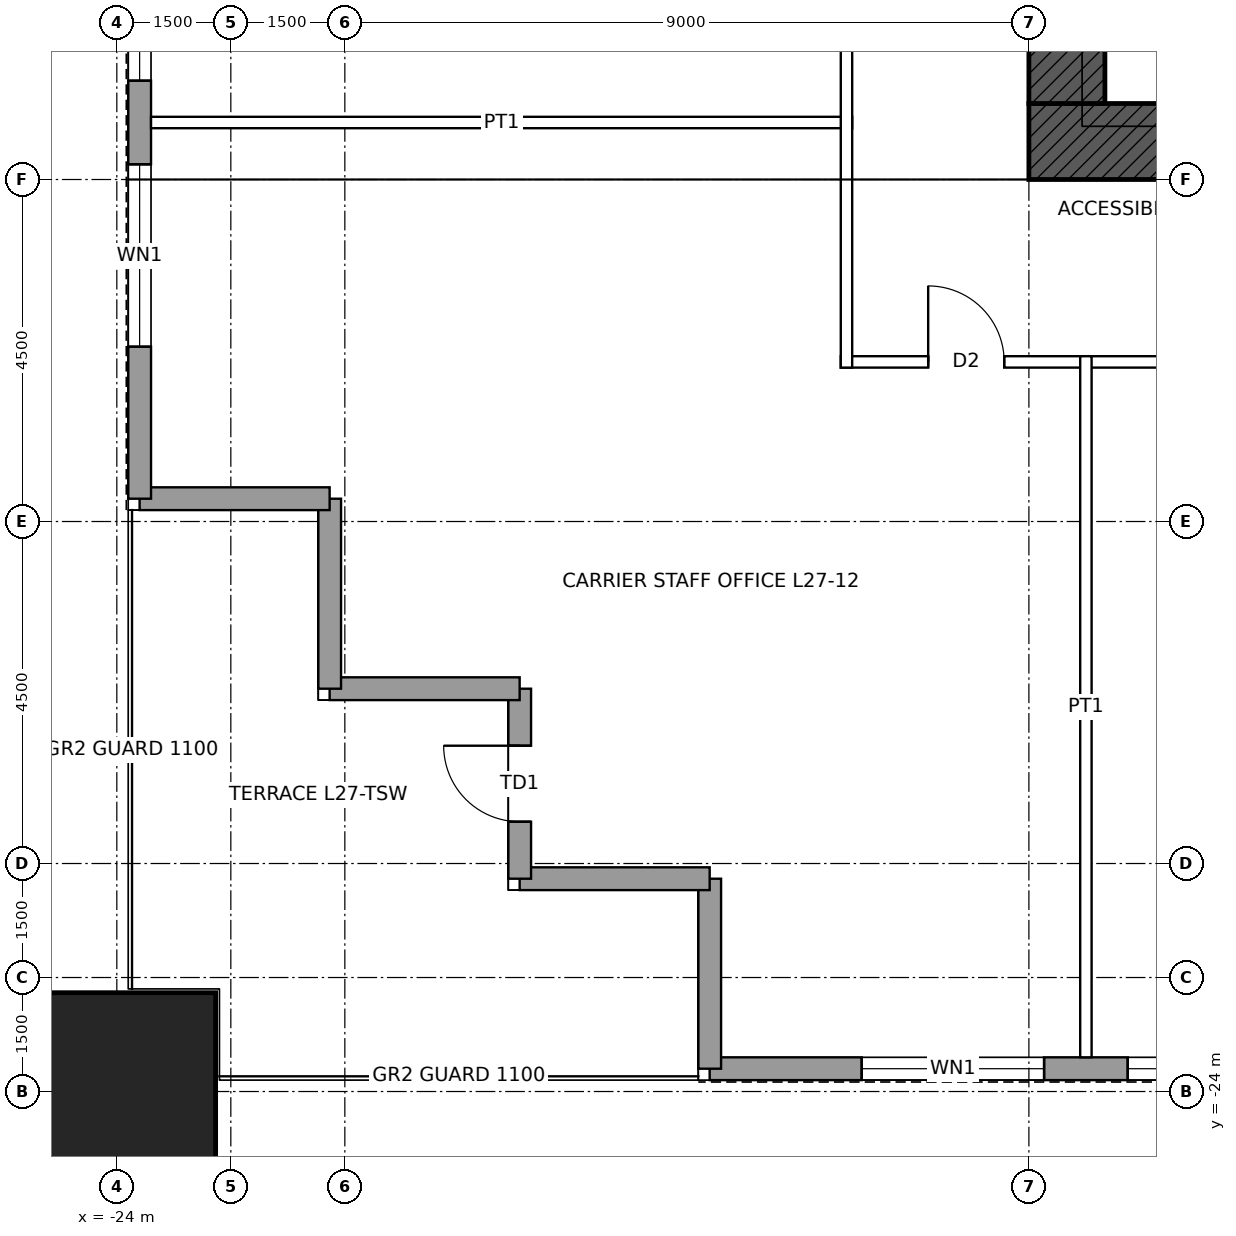
"""IFC4 building model, lengths in metres.
Left out: names, types, materials, properties, quantities, classifications, styles, units other than length and angle.
Written with IfcOpenShell. Run it as: python <this file> out.ifc"""

import sys

from ifc_helpers import new_model, si_unit, direction, frame, frame_2d, origin, origin_2d, place, context, subcontext, project, spatial, rectangle, hollow_rectangle, extrude, element, fill, save


model = new_model("IFC4")
c1 = context("Model", 3, precision=1e-05, world=origin(), true_north=direction((0.0, 1.0)))
c2 = subcontext(c1, "Body", "Model", "MODEL_VIEW")
j1 = project(units=[si_unit("LENGTHUNIT", "METRE"), si_unit("PLANEANGLEUNIT", "RADIAN")], contexts=[c1])
p1 = place(None, origin())
s1 = spatial("IfcSite", under=j1, at=p1, CompositionType="ELEMENT")
p2 = place(p1, origin())
s2 = spatial("IfcBuilding", under=s1, at=p2, CompositionType="ELEMENT")
p3 = place(p2, frame((0.0, 0.0, 135.9)))
s3 = spatial("IfcBuildingStorey", under=s2, at=p3, CompositionType="ELEMENT", Elevation=135.9)
p4 = place(p3, frame((-24.0, -24.0, 0.0), z_axis=(0.0, 0.0, 1.0), x_axis=(1.0, 0.0, 0.0)))
e1 = element("IfcColumn", 1, at=p4, inside=s3, PredefinedType="COLUMN", context=c2, shape_type="SweptSolid", body=[
    extrude(hollow_rectangle(XDim=2.6, YDim=2.6, WallThickness=0.13, at=origin_2d()), origin(), (0.0, 0.0, 1.0), 4.5),
])
p5 = place(p3, frame((12.0, -11.5, 0.0), z_axis=(0.0, 0.0, 1.0), x_axis=(-1.0, 0.0, 0.0)))
e2 = element("IfcWall", 2, at=p5, inside=s3, PredefinedType="SHEAR", context=c2, shape_type="SweptSolid", body=[
    extrude(rectangle(XDim=24.0, YDim=1.0, at=frame_2d((12.0, 0.0))), origin(), (0.0, 0.0, 1.0), 4.5),
])
p6 = place(p5, frame((11.5, 0.0, 0.0)))
e3 = element("IfcOpeningElement", 3, at=p6, cuts=e2, PredefinedType="OPENING", context=c2, shape_type="SweptSolid", body=[
    extrude(rectangle(XDim=1.0, YDim=2.1, at=frame_2d((0.5, 1.05))), frame((0.0, 0.51, 0.0), z_axis=(0.0, -1.0, 0.0), x_axis=(1.0, 0.0, 0.0)), (0.0, 0.0, 1.0), 1.02),
])
p7 = place(p5, frame((1.0, 0.0, 0.0)))
e4 = element("IfcOpeningElement", 4, at=p7, cuts=e2, PredefinedType="OPENING", context=c2, shape_type="SweptSolid", body=[
    extrude(rectangle(XDim=1.0, YDim=2.4, at=frame_2d((0.5, 1.2))), frame((0.0, 0.51, 0.0), z_axis=(0.0, -1.0, 0.0), x_axis=(1.0, 0.0, 0.0)), (0.0, 0.0, 1.0), 1.02),
])
p8 = place(p3, frame((-11.5, -11.0, 0.0), z_axis=(0.0, 0.0, 1.0), x_axis=(0.0, 1.0, 0.0)))
e5 = element("IfcWall", 5, at=p8, inside=s3, PredefinedType="SHEAR", context=c2, shape_type="SweptSolid", body=[
    extrude(rectangle(XDim=22.0, YDim=1.0, at=frame_2d((11.0, 0.0))), origin(), (0.0, 0.0, 1.0), 4.5),
])
p9 = place(p8, frame((10.5, 0.0, 0.0)))
e6 = element("IfcOpeningElement", 6, at=p9, cuts=e5, PredefinedType="OPENING", context=c2, shape_type="SweptSolid", body=[
    extrude(rectangle(XDim=1.0, YDim=2.4, at=frame_2d((0.5, 1.2))), frame((0.0, 0.51, 0.0), z_axis=(0.0, -1.0, 0.0), x_axis=(1.0, 0.0, 0.0)), (0.0, 0.0, 1.0), 1.02),
])
p10 = place(p3, frame((16.2, -23.7, 0.0), z_axis=(0.0, 0.0, 1.0), x_axis=(-1.0, 0.0, 0.0)))
e7 = element("IfcWall", 7, at=p10, inside=s3, PredefinedType="SOLIDWALL", context=c2, shape_type="SweptSolid", body=[
    extrude(rectangle(XDim=32.4, YDim=0.3, at=frame_2d((16.2, 0.0))), origin(), (0.0, 0.0, 1.0), 4.3),
])
p11 = place(p10, frame((2.0, 0.0, 1.0)))
e8 = element("IfcOpeningElement", 8, at=p11, cuts=e7, PredefinedType="OPENING", context=c2, shape_type="SweptSolid", body=[
    extrude(rectangle(XDim=2.4, YDim=1.2, at=frame_2d((1.2, 0.6))), frame((0.0, 0.16, 0.0), z_axis=(0.0, -1.0, 0.0), x_axis=(1.0, 0.0, 0.0)), (0.0, 0.0, 1.0), 0.32),
])
p12 = place(p10, frame((5.5, 0.0, 1.0)))
e9 = element("IfcOpeningElement", 9, at=p12, cuts=e7, PredefinedType="OPENING", context=c2, shape_type="SweptSolid", body=[
    extrude(rectangle(XDim=2.4, YDim=1.2, at=frame_2d((1.2, 0.6))), frame((0.0, 0.16, 0.0), z_axis=(0.0, -1.0, 0.0), x_axis=(1.0, 0.0, 0.0)), (0.0, 0.0, 1.0), 0.32),
])
p13 = place(p10, frame((9.5, 0.0, 1.0)))
e10 = element("IfcOpeningElement", 10, at=p13, cuts=e7, PredefinedType="OPENING", context=c2, shape_type="SweptSolid", body=[
    extrude(rectangle(XDim=2.4, YDim=1.2, at=frame_2d((1.2, 0.6))), frame((0.0, 0.16, 0.0), z_axis=(0.0, -1.0, 0.0), x_axis=(1.0, 0.0, 0.0)), (0.0, 0.0, 1.0), 0.32),
])
p14 = place(p10, frame((13.0, 0.0, 1.0)))
e11 = element("IfcOpeningElement", 11, at=p14, cuts=e7, PredefinedType="OPENING", context=c2, shape_type="SweptSolid", body=[
    extrude(rectangle(XDim=2.4, YDim=1.2, at=frame_2d((1.2, 0.6))), frame((0.0, 0.16, 0.0), z_axis=(0.0, -1.0, 0.0), x_axis=(1.0, 0.0, 0.0)), (0.0, 0.0, 1.0), 0.32),
])
p15 = place(p10, frame((17.0, 0.0, 1.0)))
e12 = element("IfcOpeningElement", 12, at=p15, cuts=e7, PredefinedType="OPENING", context=c2, shape_type="SweptSolid", body=[
    extrude(rectangle(XDim=2.4, YDim=1.2, at=frame_2d((1.2, 0.6))), frame((0.0, 0.16, 0.0), z_axis=(0.0, -1.0, 0.0), x_axis=(1.0, 0.0, 0.0)), (0.0, 0.0, 1.0), 0.32),
])
p16 = place(p10, frame((20.5, 0.0, 1.0)))
e13 = element("IfcOpeningElement", 13, at=p16, cuts=e7, PredefinedType="OPENING", context=c2, shape_type="SweptSolid", body=[
    extrude(rectangle(XDim=2.4, YDim=1.2, at=frame_2d((1.2, 0.6))), frame((0.0, 0.16, 0.0), z_axis=(0.0, -1.0, 0.0), x_axis=(1.0, 0.0, 0.0)), (0.0, 0.0, 1.0), 0.32),
])
p17 = place(p10, frame((24.5, 0.0, 1.0)))
e14 = element("IfcOpeningElement", 14, at=p17, cuts=e7, PredefinedType="OPENING", context=c2, shape_type="SweptSolid", body=[
    extrude(rectangle(XDim=2.4, YDim=1.2, at=frame_2d((1.2, 0.6))), frame((0.0, 0.16, 0.0), z_axis=(0.0, -1.0, 0.0), x_axis=(1.0, 0.0, 0.0)), (0.0, 0.0, 1.0), 0.32),
])
p18 = place(p10, frame((28.0, 0.0, 1.0)))
e15 = element("IfcOpeningElement", 15, at=p18, cuts=e7, PredefinedType="OPENING", context=c2, shape_type="SweptSolid", body=[
    extrude(rectangle(XDim=2.4, YDim=1.2, at=frame_2d((1.2, 0.6))), frame((0.0, 0.16, 0.0), z_axis=(0.0, -1.0, 0.0), x_axis=(1.0, 0.0, 0.0)), (0.0, 0.0, 1.0), 0.32),
])
for number, where, z_axis, x_axis in (
    (16, (-16.2, -23.7, 0.0), (0.0, 0.0, 1.0), (0.0, 1.0, 0.0)),
    (17, (-16.2, -21.2, 0.0), (0.0, 0.0, 1.0), (-1.0, 0.0, 0.0)),
):
    element("IfcWall", number, at=place(p3, frame(where, z_axis=z_axis, x_axis=x_axis)), inside=s3, PredefinedType="SOLIDWALL", context=c2, shape_type="SweptSolid", body=[
        extrude(rectangle(XDim=2.5, YDim=0.3, at=frame_2d((1.25, 0.0))), origin(), (0.0, 0.0, 1.0), 4.3),
    ])
p19 = place(p3, frame((-18.7, -21.2, 0.0), z_axis=(0.0, 0.0, 1.0), x_axis=(0.0, 1.0, 0.0)))
e18 = element("IfcWall", 18, at=p19, inside=s3, PredefinedType="SOLIDWALL", context=c2, shape_type="SweptSolid", body=[
    extrude(rectangle(XDim=2.5, YDim=0.3, at=frame_2d((1.25, 0.0))), origin(), (0.0, 0.0, 1.0), 4.3),
])
p20 = place(p19, frame((0.75, 0.0, 0.0)))
e19 = element("IfcOpeningElement", 19, at=p20, cuts=e18, PredefinedType="OPENING", context=c2, shape_type="SweptSolid", body=[
    extrude(rectangle(XDim=1.0, YDim=2.4, at=frame_2d((0.5, 1.2))), frame((0.0, 0.16, 0.0), z_axis=(0.0, -1.0, 0.0), x_axis=(1.0, 0.0, 0.0)), (0.0, 0.0, 1.0), 0.32),
])
for number, where, z_axis, x_axis in (
    (20, (-18.7, -18.7, 0.0), (0.0, 0.0, 1.0), (-1.0, 0.0, 0.0)),
    (21, (-21.2, -18.7, 0.0), (0.0, 0.0, 1.0), (0.0, 1.0, 0.0)),
    (22, (-21.2, -16.2, 0.0), (0.0, 0.0, 1.0), (-1.0, 0.0, 0.0)),
):
    element("IfcWall", number, at=place(p3, frame(where, z_axis=z_axis, x_axis=x_axis)), inside=s3, PredefinedType="SOLIDWALL", context=c2, shape_type="SweptSolid", body=[
        extrude(rectangle(XDim=2.5, YDim=0.3, at=frame_2d((1.25, 0.0))), origin(), (0.0, 0.0, 1.0), 4.3),
    ])
p21 = place(p3, frame((-23.7, -16.2, 0.0), z_axis=(0.0, 0.0, 1.0), x_axis=(0.0, 1.0, 0.0)))
e23 = element("IfcWall", 23, at=p21, inside=s3, PredefinedType="SOLIDWALL", context=c2, shape_type="SweptSolid", body=[
    extrude(rectangle(XDim=32.4, YDim=0.3, at=frame_2d((16.2, 0.0))), origin(), (0.0, 0.0, 1.0), 4.3),
])
p22 = place(p21, frame((2.0, 0.0, 1.0)))
e24 = element("IfcOpeningElement", 24, at=p22, cuts=e23, PredefinedType="OPENING", context=c2, shape_type="SweptSolid", body=[
    extrude(rectangle(XDim=2.4, YDim=1.2, at=frame_2d((1.2, 0.6))), frame((0.0, 0.16, 0.0), z_axis=(0.0, -1.0, 0.0), x_axis=(1.0, 0.0, 0.0)), (0.0, 0.0, 1.0), 0.32),
])
p23 = place(p21, frame((5.5, 0.0, 1.0)))
e25 = element("IfcOpeningElement", 25, at=p23, cuts=e23, PredefinedType="OPENING", context=c2, shape_type="SweptSolid", body=[
    extrude(rectangle(XDim=2.4, YDim=1.2, at=frame_2d((1.2, 0.6))), frame((0.0, 0.16, 0.0), z_axis=(0.0, -1.0, 0.0), x_axis=(1.0, 0.0, 0.0)), (0.0, 0.0, 1.0), 0.32),
])
p24 = place(p21, frame((9.5, 0.0, 1.0)))
e26 = element("IfcOpeningElement", 26, at=p24, cuts=e23, PredefinedType="OPENING", context=c2, shape_type="SweptSolid", body=[
    extrude(rectangle(XDim=2.4, YDim=1.2, at=frame_2d((1.2, 0.6))), frame((0.0, 0.16, 0.0), z_axis=(0.0, -1.0, 0.0), x_axis=(1.0, 0.0, 0.0)), (0.0, 0.0, 1.0), 0.32),
])
p25 = place(p21, frame((13.0, 0.0, 1.0)))
e27 = element("IfcOpeningElement", 27, at=p25, cuts=e23, PredefinedType="OPENING", context=c2, shape_type="SweptSolid", body=[
    extrude(rectangle(XDim=2.4, YDim=1.2, at=frame_2d((1.2, 0.6))), frame((0.0, 0.16, 0.0), z_axis=(0.0, -1.0, 0.0), x_axis=(1.0, 0.0, 0.0)), (0.0, 0.0, 1.0), 0.32),
])
p26 = place(p21, frame((17.0, 0.0, 1.0)))
e28 = element("IfcOpeningElement", 28, at=p26, cuts=e23, PredefinedType="OPENING", context=c2, shape_type="SweptSolid", body=[
    extrude(rectangle(XDim=2.4, YDim=1.2, at=frame_2d((1.2, 0.6))), frame((0.0, 0.16, 0.0), z_axis=(0.0, -1.0, 0.0), x_axis=(1.0, 0.0, 0.0)), (0.0, 0.0, 1.0), 0.32),
])
p27 = place(p21, frame((20.5, 0.0, 1.0)))
e29 = element("IfcOpeningElement", 29, at=p27, cuts=e23, PredefinedType="OPENING", context=c2, shape_type="SweptSolid", body=[
    extrude(rectangle(XDim=2.4, YDim=1.2, at=frame_2d((1.2, 0.6))), frame((0.0, 0.16, 0.0), z_axis=(0.0, -1.0, 0.0), x_axis=(1.0, 0.0, 0.0)), (0.0, 0.0, 1.0), 0.32),
])
p28 = place(p21, frame((24.5, 0.0, 1.0)))
e30 = element("IfcOpeningElement", 30, at=p28, cuts=e23, PredefinedType="OPENING", context=c2, shape_type="SweptSolid", body=[
    extrude(rectangle(XDim=2.4, YDim=1.2, at=frame_2d((1.2, 0.6))), frame((0.0, 0.16, 0.0), z_axis=(0.0, -1.0, 0.0), x_axis=(1.0, 0.0, 0.0)), (0.0, 0.0, 1.0), 0.32),
])
p29 = place(p21, frame((28.0, 0.0, 1.0)))
e31 = element("IfcOpeningElement", 31, at=p29, cuts=e23, PredefinedType="OPENING", context=c2, shape_type="SweptSolid", body=[
    extrude(rectangle(XDim=2.4, YDim=1.2, at=frame_2d((1.2, 0.6))), frame((0.0, 0.16, 0.0), z_axis=(0.0, -1.0, 0.0), x_axis=(1.0, 0.0, 0.0)), (0.0, 0.0, 1.0), 0.32),
])
p30 = place(p3, frame((-14.475, -14.4, 0.0), z_axis=(0.0, 0.0, 1.0), x_axis=(1.0, 0.0, 0.0)))
e32 = element("IfcWall", 32, at=p30, inside=s3, PredefinedType="PARTITIONING", context=c2, shape_type="SweptSolid", body=[
    extrude(rectangle(XDim=28.95, YDim=0.15, at=frame_2d((14.475, 0.0))), origin(), (0.0, 0.0, 1.0), 4.3),
])
p31 = place(p30, frame((21.075, 0.0, 0.0)))
e33 = element("IfcOpeningElement", 33, at=p31, cuts=e32, PredefinedType="OPENING", context=c2, shape_type="SweptSolid", body=[
    extrude(rectangle(XDim=1.8, YDim=2.4, at=frame_2d((0.9, 1.2))), frame((0.0, 0.085, 0.0), z_axis=(0.0, -1.0, 0.0), x_axis=(1.0, 0.0, 0.0)), (0.0, 0.0, 1.0), 0.17),
])
p32 = place(p30, frame((9.825, 0.0, 0.0)))
e34 = element("IfcOpeningElement", 34, at=p32, cuts=e32, PredefinedType="OPENING", context=c2, shape_type="SweptSolid", body=[
    extrude(rectangle(XDim=1.8, YDim=2.4, at=frame_2d((0.9, 1.2))), frame((0.0, 0.085, 0.0), z_axis=(0.0, -1.0, 0.0), x_axis=(1.0, 0.0, 0.0)), (0.0, 0.0, 1.0), 0.17),
])
p33 = place(p30, frame((26.8, 0.0, 0.0)))
e35 = element("IfcOpeningElement", 35, at=p33, cuts=e32, PredefinedType="OPENING", context=c2, shape_type="SweptSolid", body=[
    extrude(rectangle(XDim=1.0, YDim=2.1, at=frame_2d((0.5, 1.05))), frame((0.0, 0.085, 0.0), z_axis=(0.0, -1.0, 0.0), x_axis=(1.0, 0.0, 0.0)), (0.0, 0.0, 1.0), 0.17),
])
p34 = place(p30, frame((1.15, 0.0, 0.0)))
e36 = element("IfcOpeningElement", 36, at=p34, cuts=e32, PredefinedType="OPENING", context=c2, shape_type="SweptSolid", body=[
    extrude(rectangle(XDim=1.0, YDim=2.1, at=frame_2d((0.5, 1.05))), frame((0.0, 0.085, 0.0), z_axis=(0.0, -1.0, 0.0), x_axis=(1.0, 0.0, 0.0)), (0.0, 0.0, 1.0), 0.17),
])
p35 = place(p3, frame((-23.55, -11.25, 0.0), z_axis=(0.0, 0.0, 1.0), x_axis=(1.0, 0.0, 0.0)))
e37 = element("IfcWall", 37, at=p35, inside=s3, PredefinedType="PARTITIONING", context=c2, shape_type="SweptSolid", body=[
    extrude(rectangle(XDim=9.225, YDim=0.15, at=frame_2d((4.613, 0.0))), origin(), (0.0, 0.0, 1.0), 3.431),
])
p36 = place(p3, frame((-14.4, -14.475, 0.0), z_axis=(0.0, 0.0, 1.0), x_axis=(0.0, 1.0, 0.0)))
e38 = element("IfcWall", 38, at=p36, inside=s3, PredefinedType="PARTITIONING", context=c2, shape_type="SweptSolid", body=[
    extrude(rectangle(XDim=28.95, YDim=0.15, at=frame_2d((14.475, 0.0))), origin(), (0.0, 0.0, 1.0), 4.3),
])
p37 = place(p36, frame((4.2, 0.0, 0.0)))
e39 = element("IfcOpeningElement", 39, at=p37, cuts=e38, PredefinedType="OPENING", context=c2, shape_type="SweptSolid", body=[
    extrude(rectangle(XDim=1.8, YDim=2.4, at=frame_2d((0.9, 1.2))), frame((0.0, 0.085, 0.0), z_axis=(0.0, -1.0, 0.0), x_axis=(1.0, 0.0, 0.0)), (0.0, 0.0, 1.0), 0.17),
])
p38 = place(p36, frame((12.1, 0.0, 0.0)))
e40 = element("IfcOpeningElement", 40, at=p38, cuts=e38, PredefinedType="OPENING", context=c2, shape_type="SweptSolid", body=[
    extrude(rectangle(XDim=1.0, YDim=2.1, at=frame_2d((0.5, 1.05))), frame((0.0, 0.085, 0.0), z_axis=(0.0, -1.0, 0.0), x_axis=(1.0, 0.0, 0.0)), (0.0, 0.0, 1.0), 0.17),
])
p39 = place(p36, frame((21.075, 0.0, 0.0)))
e41 = element("IfcOpeningElement", 41, at=p39, cuts=e38, PredefinedType="OPENING", context=c2, shape_type="SweptSolid", body=[
    extrude(rectangle(XDim=1.8, YDim=2.4, at=frame_2d((0.9, 1.2))), frame((0.0, 0.085, 0.0), z_axis=(0.0, -1.0, 0.0), x_axis=(1.0, 0.0, 0.0)), (0.0, 0.0, 1.0), 0.17),
])
p40 = place(p3, frame((-11.25, -23.55, 0.0), z_axis=(0.0, 0.0, 1.0), x_axis=(0.0, 1.0, 0.0)))
e42 = element("IfcWall", 42, at=p40, inside=s3, PredefinedType="PARTITIONING", context=c2, shape_type="SweptSolid", body=[
    extrude(rectangle(XDim=9.225, YDim=0.15, at=frame_2d((4.613, 0.0))), origin(), (0.0, 0.0, 1.0), 3.431),
])
p41 = place(p17, origin())
e43 = element("IfcWindow", 43, at=p41, inside=s3, PartitioningType="SINGLE_PANEL", PredefinedType="WINDOW", context=c2, shape_type="SweptSolid", body=[
    extrude(rectangle(XDim=2.4, YDim=1.2, at=frame_2d((1.2, 0.6))), frame((0.0, 0.03, 0.0), z_axis=(0.0, -1.0, 0.0), x_axis=(1.0, 0.0, 0.0)), (0.0, 0.0, 1.0), 0.06),
])
fill(e14, e43)
p42 = place(p18, origin())
e44 = element("IfcWindow", 44, at=p42, inside=s3, PartitioningType="SINGLE_PANEL", PredefinedType="WINDOW", context=c2, shape_type="SweptSolid", body=[
    extrude(rectangle(XDim=2.4, YDim=1.2, at=frame_2d((1.2, 0.6))), frame((0.0, 0.03, 0.0), z_axis=(0.0, -1.0, 0.0), x_axis=(1.0, 0.0, 0.0)), (0.0, 0.0, 1.0), 0.06),
])
fill(e15, e44)
p43 = place(p20, origin())
e45 = element("IfcDoor", 45, at=p43, inside=s3, OperationType="SINGLE_SWING_RIGHT", PredefinedType="DOOR", context=c2, shape_type="SweptSolid", body=[
    extrude(rectangle(XDim=1.0, YDim=2.4, at=frame_2d((0.5, 1.2))), frame((0.0, 0.025, 0.0), z_axis=(0.0, -1.0, 0.0), x_axis=(1.0, 0.0, 0.0)), (0.0, 0.0, 1.0), 0.05),
])
fill(e19, e45)
p44 = place(p22, origin())
e46 = element("IfcWindow", 46, at=p44, inside=s3, PartitioningType="SINGLE_PANEL", PredefinedType="WINDOW", context=c2, shape_type="SweptSolid", body=[
    extrude(rectangle(XDim=2.4, YDim=1.2, at=frame_2d((1.2, 0.6))), frame((0.0, 0.03, 0.0), z_axis=(0.0, -1.0, 0.0), x_axis=(1.0, 0.0, 0.0)), (0.0, 0.0, 1.0), 0.06),
])
fill(e24, e46)
p45 = place(p23, origin())
e47 = element("IfcWindow", 47, at=p45, inside=s3, PartitioningType="SINGLE_PANEL", PredefinedType="WINDOW", context=c2, shape_type="SweptSolid", body=[
    extrude(rectangle(XDim=2.4, YDim=1.2, at=frame_2d((1.2, 0.6))), frame((0.0, 0.03, 0.0), z_axis=(0.0, -1.0, 0.0), x_axis=(1.0, 0.0, 0.0)), (0.0, 0.0, 1.0), 0.06),
])
fill(e25, e47)
p46 = place(p34, origin())
e48 = element("IfcDoor", 48, at=p46, inside=s3, OperationType="SINGLE_SWING_LEFT", PredefinedType="DOOR", context=c2, shape_type="SweptSolid", body=[
    extrude(rectangle(XDim=1.0, YDim=2.1, at=frame_2d((0.5, 1.05))), frame((0.0, 0.025, 0.0), z_axis=(0.0, -1.0, 0.0), x_axis=(1.0, 0.0, 0.0)), (0.0, 0.0, 1.0), 0.05),
])
fill(e36, e48)
save(model, sys.argv[1])
